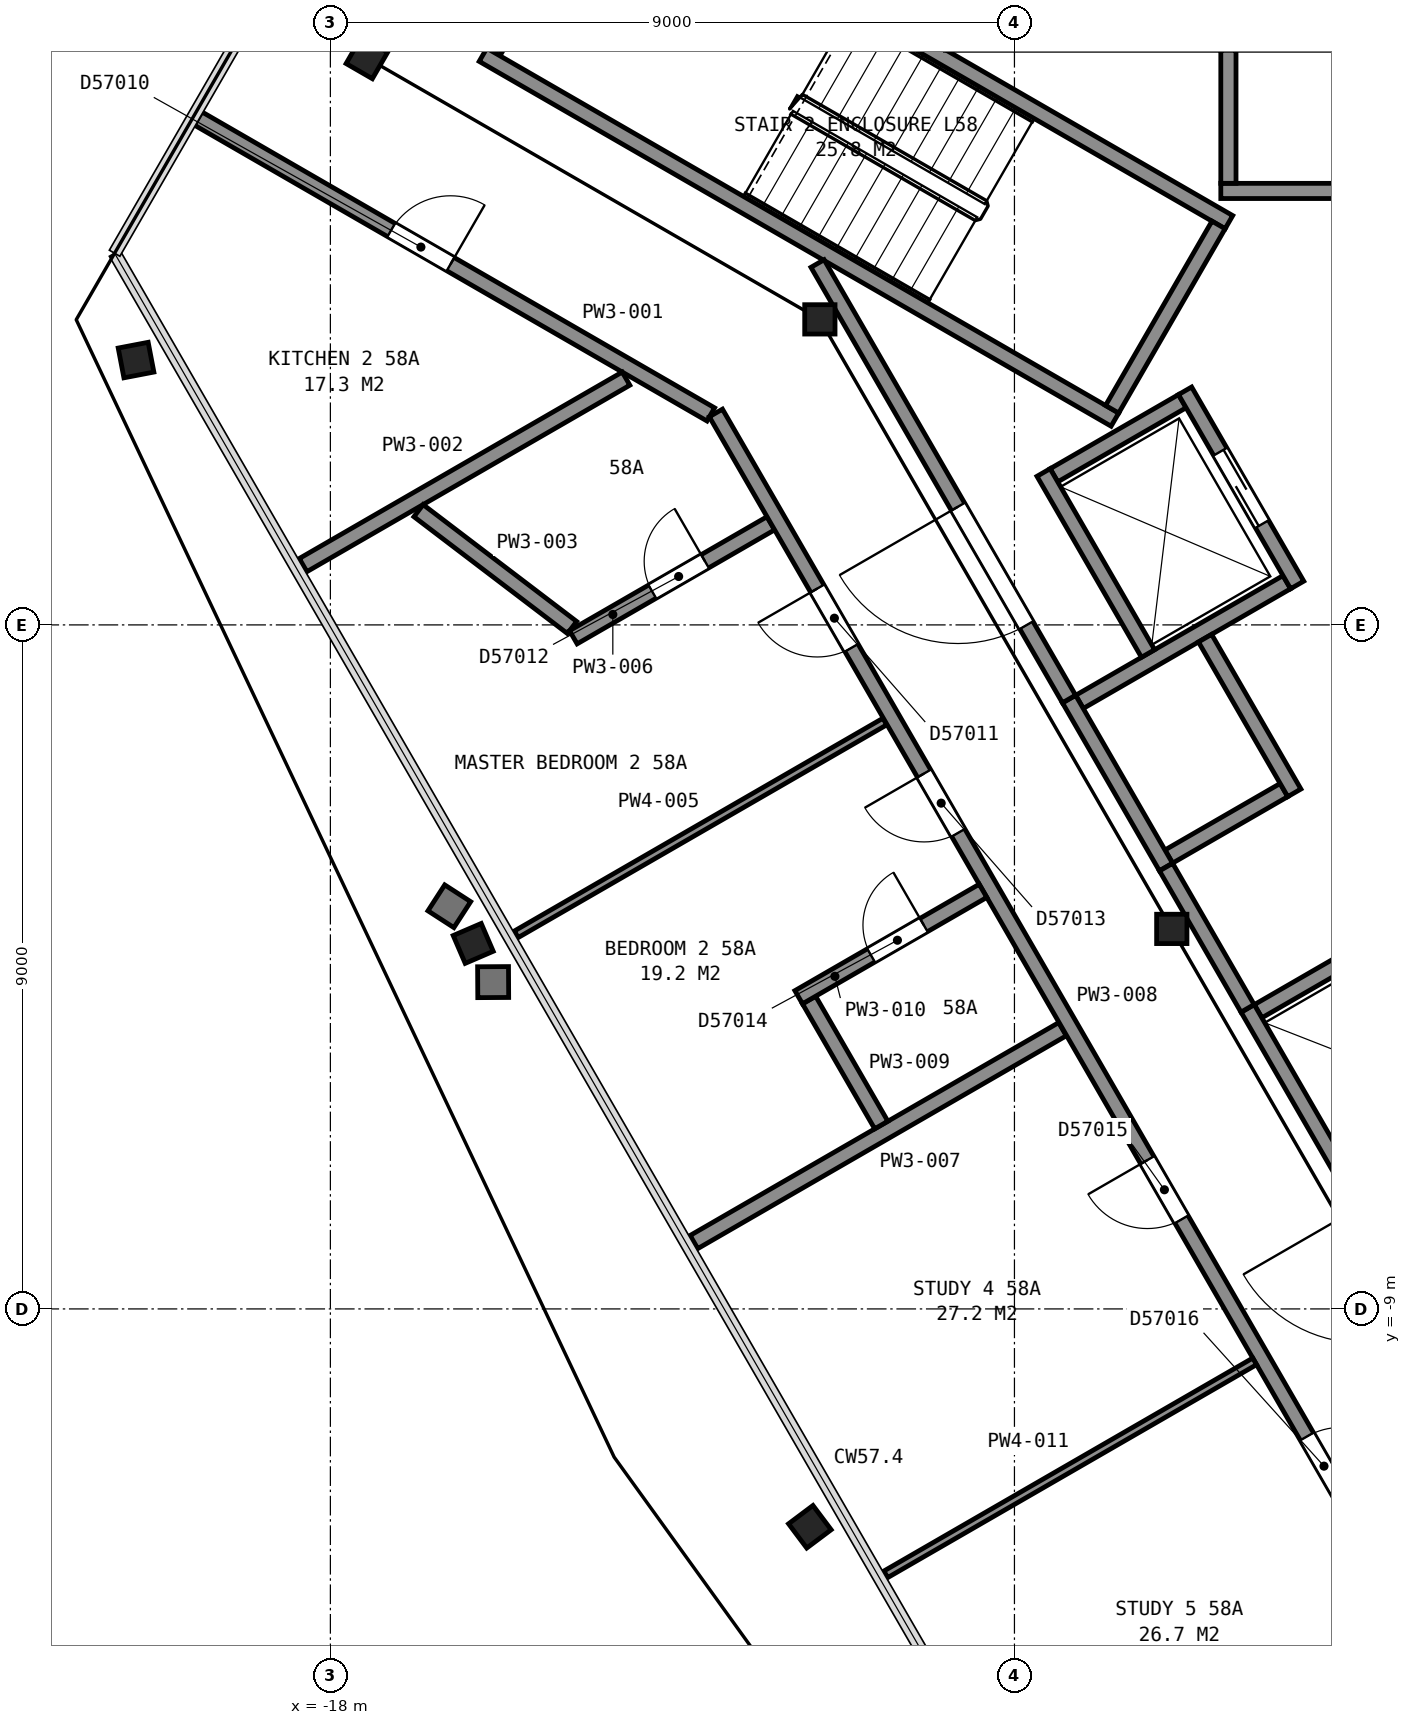
"""IFC4 building model, lengths in metres.
Left out: names, types, materials, properties, quantities, classifications, styles, units other than length and angle.
Written with IfcOpenShell. Run it as: python <this file> out.ifc"""

import sys

from ifc_helpers import new_model, si_unit, direction, frame, frame_2d, origin, origin_2d, place, context, subcontext, project, spatial, rectangle, i_section, extrude, element, fill, save


model = new_model("IFC4")
c1 = context("Model", 3, precision=1e-05, world=origin(), true_north=direction((0.0, 1.0)))
c2 = subcontext(c1, "Body", "Model", "MODEL_VIEW")
j1 = project(units=[si_unit("LENGTHUNIT", "METRE"), si_unit("PLANEANGLEUNIT", "RADIAN")], contexts=[c1])
p1 = place(None, origin())
s1 = spatial("IfcSite", under=j1, at=p1, CompositionType="ELEMENT")
p2 = place(p1, origin())
s2 = spatial("IfcBuilding", under=s1, at=p2, CompositionType="ELEMENT")
p3 = place(p2, frame((0.0, 0.0, 232.3)))
s3 = spatial("IfcBuildingStorey", under=s2, at=p3, CompositionType="ELEMENT", Elevation=232.3)
p4 = place(p3, frame((-20.328, 3.529, 0.04), z_axis=(-0.19341182923, -0.037095396991, 0.980416134015), x_axis=(-0.498932099925, 0.864144788984, -0.065730840066)))
e1 = element("IfcColumn", 1, at=p4, inside=s3, PredefinedType="COLUMN", context=c2, shape_type="SweptSolid", body=[
    extrude(i_section(OverallWidth=0.401, OverallDepth=0.399, WebThickness=0.025, FlangeThickness=0.04, FilletRadius=0.015, at=origin_2d()), origin(), (0.0, 0.0, 1.0), 3.692),
])
p5 = place(p3, frame((-15.916, -4.103, 0.035), z_axis=(-0.172603021318, -0.074378492921, 0.982179228462), x_axis=(-0.499986606679, 0.865745882945, -0.022303795753)))
e2 = element("IfcColumn", 2, at=p5, inside=s3, PredefinedType="COLUMN", context=c2, shape_type="SweptSolid", body=[
    extrude(i_section(OverallWidth=0.401, OverallDepth=0.399, WebThickness=0.025, FlangeThickness=0.04, FilletRadius=0.015, at=origin_2d()), origin(), (0.0, 0.0, 1.0), 3.696),
])
p6 = place(p3, frame((-11.515, -11.734, 0.035), z_axis=(-0.148684508118, -0.11154642209, 0.982573311649), x_axis=(-0.499994347872, 0.865733149293, 0.022622252559)))
e3 = element("IfcColumn", 3, at=p6, inside=s3, PredefinedType="COLUMN", context=c2, shape_type="SweptSolid", body=[
    extrude(i_section(OverallWidth=0.401, OverallDepth=0.399, WebThickness=0.025, FlangeThickness=0.04, FilletRadius=0.015, at=origin_2d()), origin(), (0.0, 0.0, 1.0), 3.695),
])
p7 = place(p3, frame((-17.52, 7.46, 0.0), z_axis=(0.0, 0.0, 1.0), x_axis=(0.5, 0.866025403784, 0.0)))
e4 = element("IfcColumn", 4, at=p7, inside=s3, PredefinedType="COLUMN", context=c2, shape_type="SweptSolid", body=[
    extrude(i_section(OverallWidth=0.401, OverallDepth=0.399, WebThickness=0.025, FlangeThickness=0.04, FilletRadius=0.015, at=origin_2d()), origin(), (0.0, 0.0, 1.0), 3.7),
])
for number, where, z_axis, x_axis in (
    (5, (-11.56, 4.02, 0.0), (0.0, 0.0, 1.0), (1.0, 0.0, 0.0)),
    (6, (-6.93, -4.0, 0.0), (0.0, 0.0, 1.0), (1.0, 0.0, 0.0)),
):
    element("IfcColumn", number, at=place(p3, frame(where, z_axis=z_axis, x_axis=x_axis)), inside=s3, PredefinedType="COLUMN", context=c2, shape_type="SweptSolid", body=[
        extrude(i_section(OverallWidth=0.399, OverallDepth=0.386, WebThickness=0.021, FlangeThickness=0.033, FilletRadius=0.015, at=origin_2d()), origin(), (0.0, 0.0, 1.0), 3.7),
    ])
p8 = place(p3, frame((-14.455, 9.962, 0.0), z_axis=(0.0, 0.0, 1.0), x_axis=(-0.500049511043, -0.865996816683, 0.0)))
e7 = element("IfcWall", 7, at=p8, inside=s3, PredefinedType="PARTITIONING", context=c2, shape_type="SweptSolid", body=[
    extrude(rectangle(XDim=2.8, YDim=0.2, at=frame_2d((1.4, 0.0))), origin(), (0.0, 0.0, 1.0), 3.45),
])
p9 = place(p8, frame((0.85, 0.0, 0.0)))
e8 = element("IfcOpeningElement", 8, at=p9, cuts=e7, PredefinedType="OPENING", context=c2, shape_type="SweptSolid", body=[
    extrude(rectangle(XDim=1.1, YDim=2.1, at=frame_2d((0.55, 1.05))), frame((0.0, 0.11, 0.0), z_axis=(0.0, -1.0, 0.0), x_axis=(1.0, 0.0, 0.0)), (0.0, 0.0, 1.0), 0.22),
])
for number, where, z_axis, x_axis in (
    (9, (-7.678, 2.701, 0.0), (0.0, 0.0, 1.0), (-0.866, 0.5, 0.0)),
    (10, (-6.178, 5.299, 0.0), (0.0, 0.0, 1.0), (-0.866, 0.5, 0.0)),
):
    element("IfcWall", number, at=place(p3, frame(where, z_axis=z_axis, x_axis=x_axis)), inside=s3, PredefinedType="PARTITIONING", context=c2, shape_type="SweptSolid", body=[
        extrude(rectangle(XDim=9.6, YDim=0.2, at=frame_2d((4.8, 0.0))), origin(), (0.0, 0.0, 1.0), 3.45),
    ])
p10 = place(p3, frame((-6.315, 5.262, 0.0), z_axis=(0.0, 0.0, 1.0), x_axis=(-0.500049511043, -0.865996816683, 0.0)))
e11 = element("IfcWall", 11, at=p10, inside=s3, PredefinedType="PARTITIONING", context=c2, shape_type="SweptSolid", body=[
    extrude(rectangle(XDim=2.8, YDim=0.2, at=frame_2d((1.4, 0.0))), origin(), (0.0, 0.0, 1.0), 3.45),
])
p11 = place(p3, frame((-6.285, 5.71, 0.0), z_axis=(0.0, 0.0, 1.0), x_axis=(1.0, 0.0, 0.0)))
e12 = element("IfcWall", 12, at=p11, inside=s3, PredefinedType="PARTITIONING", context=c2, shape_type="SweptSolid", body=[
    extrude(rectangle(XDim=2.35, YDim=0.2, at=frame_2d((1.175, 0.0))), origin(), (0.0, 0.0, 1.0), 3.7),
])
for number, where, z_axis, x_axis in (
    (13, (-5.795, -5.083, 0.0), (0.0, 0.0, 1.0), (0.866, 0.5, 0.0)),
    (14, (-6.97, -3.048, 0.0), (0.0, 0.0, 1.0), (0.866, 0.5, 0.0)),
):
    element("IfcWall", number, at=place(p3, frame(where, z_axis=z_axis, x_axis=x_axis)), inside=s3, PredefinedType="PARTITIONING", context=c2, shape_type="SweptSolid", body=[
        extrude(rectangle(XDim=1.75, YDim=0.2, at=frame_2d((0.875, 0.0))), origin(), (0.0, 0.0, 1.0), 3.7),
    ])
p12 = place(p3, frame((-8.145, -1.013, 0.0), z_axis=(0.0, 0.0, 1.0), x_axis=(0.866016494683, 0.500015430699, 0.0)))
e15 = element("IfcWall", 15, at=p12, inside=s3, PredefinedType="PARTITIONING", context=c2, shape_type="SweptSolid", body=[
    extrude(rectangle(XDim=3.15, YDim=0.2, at=frame_2d((1.575, 0.0))), origin(), (0.0, 0.0, 1.0), 3.7),
])
p13 = place(p3, frame((-8.48, 1.969, 0.0), z_axis=(0.0, 0.0, 1.0), x_axis=(0.866000020948, 0.500043961785, 0.0)))
e16 = element("IfcWall", 16, at=p13, inside=s3, PredefinedType="PARTITIONING", context=c2, shape_type="SweptSolid", body=[
    extrude(rectangle(XDim=1.95, YDim=0.2, at=frame_2d((0.975, 0.0))), origin(), (0.0, 0.0, 1.0), 3.7),
])
p14 = place(p3, frame((-6.185, 5.81, 0.0), z_axis=(0.0, 0.0, 1.0), x_axis=(0.0, 1.0, 0.0)))
e17 = element("IfcWall", 17, at=p14, inside=s3, PredefinedType="PARTITIONING", context=c2, shape_type="SweptSolid", body=[
    extrude(rectangle(XDim=1.75, YDim=0.2, at=frame_2d((0.875, 0.0))), origin(), (0.0, 0.0, 1.0), 3.7),
])
p15 = place(p3, frame((-5.28, 0.525, 0.0), z_axis=(0.0, 0.0, 1.0), x_axis=(-0.500037662692, 0.866003658127, 0.0)))
e18 = element("IfcWall", 18, at=p15, inside=s3, PredefinedType="PARTITIONING", context=c2, shape_type="SweptSolid", body=[
    extrude(rectangle(XDim=2.95, YDim=0.2, at=frame_2d((1.475, 0.0))), origin(), (0.0, 0.0, 1.0), 3.7),
])
p16 = place(p15, frame((0.925, 0.0, 0.0)))
e19 = element("IfcOpeningElement", 19, at=p16, cuts=e18, PredefinedType="OPENING", context=c2, shape_type="SweptSolid", body=[
    extrude(rectangle(XDim=1.1, YDim=2.1, at=frame_2d((0.55, 1.05))), frame((0.0, 0.11, 0.0), z_axis=(0.0, -1.0, 0.0), x_axis=(1.0, 0.0, 0.0)), (0.0, 0.0, 1.0), 0.22),
])
p17 = place(p3, frame((-5.318, -2.21, 0.0), z_axis=(0.0, 0.0, 1.0), x_axis=(-0.499938297808, 0.866061024631, 0.0)))
e20 = element("IfcWall", 20, at=p17, inside=s3, PredefinedType="PARTITIONING", context=c2, shape_type="SweptSolid", body=[
    extrude(rectangle(XDim=2.35, YDim=0.2, at=frame_2d((1.175, 0.0))), origin(), (0.0, 0.0, 1.0), 3.7),
])
p18 = place(p3, frame((-7.242, -0.376, 0.0), z_axis=(0.0, 0.0, 1.0), x_axis=(-0.499996545922, 0.866027397988, 0.0)))
e21 = element("IfcWall", 21, at=p18, inside=s3, PredefinedType="PARTITIONING", context=c2, shape_type="SweptSolid", body=[
    extrude(rectangle(XDim=2.75, YDim=0.2, at=frame_2d((1.375, 0.0))), origin(), (0.0, 0.0, 1.0), 3.7),
])
for number, where, z_axis, x_axis in (
    (22, (-4.656, -7.255, 0.0), (0.0, 0.0, 1.0), (-0.5, 0.866, 0.0)),
    (23, (-7.006, -3.185, 0.0), (0.0, 0.0, 1.0), (-0.5, 0.866, 0.0)),
):
    element("IfcWall", number, at=place(p3, frame(where, z_axis=z_axis, x_axis=x_axis)), inside=s3, PredefinedType="PARTITIONING", context=c2, shape_type="SweptSolid", body=[
        extrude(rectangle(XDim=2.55, YDim=0.2, at=frame_2d((1.275, 0.0))), origin(), (0.0, 0.0, 1.0), 3.7),
    ])
p19 = place(p3, frame((-11.591, 4.755, 0.0), z_axis=(0.0, 0.0, 1.0), x_axis=(0.500043977787, -0.866000011708, 0.0)))
e24 = element("IfcWall", 24, at=p19, inside=s3, PredefinedType="PARTITIONING", context=c2, shape_type="SweptSolid", body=[
    extrude(rectangle(XDim=6.617, YDim=0.2, at=frame_2d((3.308, 0.0))), origin(), (0.0, 0.0, 1.0), 3.45),
])
p20 = place(p19, frame((3.695, 0.0, 0.0)))
e25 = element("IfcOpeningElement", 25, at=p20, cuts=e24, PredefinedType="OPENING", context=c2, shape_type="SweptSolid", body=[
    extrude(rectangle(XDim=1.8, YDim=2.1, at=frame_2d((0.9, 1.05))), frame((0.0, 0.11, 0.0), z_axis=(0.0, -1.0, 0.0), x_axis=(1.0, 0.0, 0.0)), (0.0, 0.0, 1.0), 0.22),
])
p21 = place(p3, frame((-7.005, -3.187, 0.0), z_axis=(0.0, 0.0, 1.0), x_axis=(0.499689606989, -0.866204535123, 0.0)))
e26 = element("IfcWall", 26, at=p21, inside=s3, PredefinedType="PARTITIONING", context=c2, shape_type="SweptSolid", body=[
    extrude(rectangle(XDim=2.145, YDim=0.2, at=frame_2d((1.072, 0.0))), origin(), (0.0, 0.0, 1.0), 3.45),
])
p22 = place(p3, frame((-12.995, 2.77, 0.0), z_axis=(0.0, 0.0, 1.0), x_axis=(-0.866060835767, 0.499938624983, 0.0)))
e27 = element("IfcWall", 27, at=p22, inside=s3, PredefinedType="PARTITIONING", context=c2, shape_type="SweptSolid", body=[
    extrude(rectangle(XDim=7.789, YDim=0.2, at=frame_2d((3.894, 0.0))), origin(), (0.0, 0.0, 1.0), 2.713),
])
p23 = place(p22, frame((3.954, 0.0, 0.0)))
e28 = element("IfcOpeningElement", 28, at=p23, cuts=e27, PredefinedType="OPENING", context=c2, shape_type="SweptSolid", body=[
    extrude(rectangle(XDim=0.9, YDim=2.1, at=frame_2d((0.45, 1.05))), frame((0.0, 0.11, 0.0), z_axis=(0.0, -1.0, 0.0), x_axis=(1.0, 0.0, 0.0)), (0.0, 0.0, 1.0), 0.22),
])
p24 = place(p3, frame((-18.359, 0.787, 0.0), z_axis=(0.0, 0.0, 1.0), x_axis=(0.86596515875, 0.500104332946, 0.0)))
e29 = element("IfcWall", 29, at=p24, inside=s3, PredefinedType="PARTITIONING", context=c2, shape_type="SweptSolid", body=[
    extrude(rectangle(XDim=4.907, YDim=0.2, at=frame_2d((2.453, 0.0))), origin(), (0.0, 0.0, 1.0), 2.713),
])
p25 = place(p3, frame((-16.84, 1.503, 0.0), z_axis=(0.0, 0.0, 1.0), x_axis=(0.79576722268, -0.605602615012, 0.0)))
e30 = element("IfcWall", 30, at=p25, inside=s3, PredefinedType="PARTITIONING", context=c2, shape_type="SweptSolid", body=[
    extrude(rectangle(XDim=2.538, YDim=0.2, at=frame_2d((1.269, 0.0))), origin(), (0.0, 0.0, 1.0), 2.713),
])
p26 = place(p3, frame((-15.555, -4.071, 0.0), z_axis=(0.0, 0.0, 1.0), x_axis=(0.866083225238, 0.499899836928, 0.0)))
e31 = element("IfcWall", 31, at=p26, inside=s3, PredefinedType="PARTITIONING", context=c2, shape_type="SweptSolid", body=[
    extrude(rectangle(XDim=5.6, YDim=0.1, at=frame_2d((2.8, 0.0))), origin(), (0.0, 0.0, 1.0), 2.713),
])
p27 = place(p3, frame((-14.804, -0.163, 0.0), z_axis=(0.0, 0.0, 1.0), x_axis=(0.866031096941, 0.499990139034, 0.0)))
e32 = element("IfcWall", 32, at=p27, inside=s3, PredefinedType="PARTITIONING", context=c2, shape_type="SweptSolid", body=[
    extrude(rectangle(XDim=3.0, YDim=0.2, at=frame_2d((1.5, 0.0))), origin(), (0.0, 0.0, 1.0), 2.713),
])
p28 = place(p27, frame((1.2, 0.0, 0.0)))
e33 = element("IfcOpeningElement", 33, at=p28, cuts=e32, PredefinedType="OPENING", context=c2, shape_type="SweptSolid", body=[
    extrude(rectangle(XDim=0.8, YDim=2.1, at=frame_2d((0.4, 1.05))), frame((0.0, 0.11, 0.0), z_axis=(0.0, -1.0, 0.0), x_axis=(1.0, 0.0, 0.0)), (0.0, 0.0, 1.0), 0.22),
])
p29 = place(p3, frame((-13.217, -8.12, 0.0), z_axis=(0.0, 0.0, 1.0), x_axis=(0.865964107429, 0.500106153376, 0.0)))
e34 = element("IfcWall", 34, at=p29, inside=s3, PredefinedType="PARTITIONING", context=c2, shape_type="SweptSolid", body=[
    extrude(rectangle(XDim=5.599, YDim=0.2, at=frame_2d((2.8, 0.0))), origin(), (0.0, 0.0, 1.0), 2.713),
])
p30 = place(p3, frame((-4.075, -12.545, 0.0), z_axis=(0.0, 0.0, 1.0), x_axis=(-0.499997769292, 0.86602669168, 0.0)))
e35 = element("IfcWall", 35, at=p30, inside=s3, PredefinedType="PARTITIONING", context=c2, shape_type="SweptSolid", body=[
    extrude(rectangle(XDim=17.706, YDim=0.2, at=frame_2d((8.853, 0.0))), origin(), (0.0, 0.0, 1.0), 2.713),
])
p31 = place(p30, frame((14.138, 0.0, 0.0)))
e36 = element("IfcOpeningElement", 36, at=p31, cuts=e35, PredefinedType="OPENING", context=c2, shape_type="SweptSolid", body=[
    extrude(rectangle(XDim=0.9, YDim=2.1, at=frame_2d((0.45, 1.05))), frame((0.0, 0.11, 0.0), z_axis=(0.0, -1.0, 0.0), x_axis=(1.0, 0.0, 0.0)), (0.0, 0.0, 1.0), 0.22),
])
p32 = place(p30, frame((11.328, 0.0, 0.0)))
e37 = element("IfcOpeningElement", 37, at=p32, cuts=e35, PredefinedType="OPENING", context=c2, shape_type="SweptSolid", body=[
    extrude(rectangle(XDim=0.9, YDim=2.1, at=frame_2d((0.45, 1.05))), frame((0.0, 0.11, 0.0), z_axis=(0.0, -1.0, 0.0), x_axis=(1.0, 0.0, 0.0)), (0.0, 0.0, 1.0), 0.22),
])
p33 = place(p30, frame((5.454, 0.0, 0.0)))
e38 = element("IfcOpeningElement", 38, at=p33, cuts=e35, PredefinedType="OPENING", context=c2, shape_type="SweptSolid", body=[
    extrude(rectangle(XDim=0.9, YDim=2.1, at=frame_2d((0.45, 1.05))), frame((0.0, 0.11, 0.0), z_axis=(0.0, -1.0, 0.0), x_axis=(1.0, 0.0, 0.0)), (0.0, 0.0, 1.0), 0.22),
])
p34 = place(p30, frame((1.255, 0.0, 0.0)))
e39 = element("IfcOpeningElement", 39, at=p34, cuts=e35, PredefinedType="OPENING", context=c2, shape_type="SweptSolid", body=[
    extrude(rectangle(XDim=0.9, YDim=2.1, at=frame_2d((0.45, 1.05))), frame((0.0, 0.11, 0.0), z_axis=(0.0, -1.0, 0.0), x_axis=(1.0, 0.0, 0.0)), (0.0, 0.0, 1.0), 0.22),
])
p35 = place(p3, frame((-11.702, -4.936, 0.0), z_axis=(0.0, 0.0, 1.0), x_axis=(0.500134112126, -0.865947960265, 0.0)))
e40 = element("IfcWall", 40, at=p35, inside=s3, PredefinedType="PARTITIONING", context=c2, shape_type="SweptSolid", body=[
    extrude(rectangle(XDim=1.899, YDim=0.2, at=frame_2d((0.95, 0.0))), origin(), (0.0, 0.0, 1.0), 2.713),
])
p36 = place(p3, frame((-9.414, -3.499, 0.0), z_axis=(0.0, 0.0, 1.0), x_axis=(-0.866056369097, -0.49994636267, 0.0)))
e41 = element("IfcWall", 41, at=p36, inside=s3, PredefinedType="PARTITIONING", context=c2, shape_type="SweptSolid", body=[
    extrude(rectangle(XDim=2.8, YDim=0.2, at=frame_2d((1.4, 0.0))), origin(), (0.0, 0.0, 1.0), 2.713),
])
p37 = place(p36, frame((0.9, 0.0, 0.0)))
e42 = element("IfcOpeningElement", 42, at=p37, cuts=e41, PredefinedType="OPENING", context=c2, shape_type="SweptSolid", body=[
    extrude(rectangle(XDim=0.8, YDim=2.1, at=frame_2d((0.4, 1.05))), frame((0.0, 0.11, 0.0), z_axis=(0.0, -1.0, 0.0), x_axis=(1.0, 0.0, 0.0)), (0.0, 0.0, 1.0), 0.22),
])
p38 = place(p3, frame((-10.693, -12.492, 0.0), z_axis=(0.0, 0.0, 1.0), x_axis=(0.866017266313, 0.500014094249, 0.0)))
e43 = element("IfcWall", 43, at=p38, inside=s3, PredefinedType="PARTITIONING", context=c2, shape_type="SweptSolid", body=[
    extrude(rectangle(XDim=5.604, YDim=0.1, at=frame_2d((2.802, 0.0))), origin(), (0.0, 0.0, 1.0), 2.713),
])
p39 = place(p16, origin())
e44 = element("IfcDoor", 44, at=p39, inside=s3, OperationType="SLIDING_TO_LEFT", PredefinedType="DOOR", context=c2, shape_type="SweptSolid", body=[
    extrude(rectangle(XDim=1.1, YDim=2.1, at=frame_2d((0.55, 1.05))), frame((0.0, 0.025, 0.0), z_axis=(0.0, -1.0, 0.0), x_axis=(1.0, 0.0, 0.0)), (0.0, 0.0, 1.0), 0.05),
])
fill(e19, e44)
p40 = place(p20, origin())
e45 = element("IfcDoor", 45, at=p40, inside=s3, OperationType="DOUBLE_DOOR_SINGLE_SWING", PredefinedType="DOOR", context=c2, shape_type="SweptSolid", body=[
    extrude(rectangle(XDim=1.8, YDim=2.1, at=frame_2d((0.9, 1.05))), frame((0.0, 0.025, 0.0), z_axis=(0.0, -1.0, 0.0), x_axis=(1.0, 0.0, 0.0)), (0.0, 0.0, 1.0), 0.05),
])
fill(e25, e45)
p41 = place(p23, origin())
e46 = element("IfcDoor", 46, at=p41, inside=s3, OperationType="SINGLE_SWING_LEFT", PredefinedType="DOOR", context=c2, shape_type="SweptSolid", body=[
    extrude(rectangle(XDim=0.9, YDim=2.1, at=frame_2d((0.45, 1.05))), frame((0.0, 0.025, 0.0), z_axis=(0.0, -1.0, 0.0), x_axis=(1.0, 0.0, 0.0)), (0.0, 0.0, 1.0), 0.05),
])
fill(e28, e46)
p42 = place(p28, origin())
e47 = element("IfcDoor", 47, at=p42, inside=s3, OperationType="SINGLE_SWING_RIGHT", PredefinedType="DOOR", context=c2, shape_type="SweptSolid", body=[
    extrude(rectangle(XDim=0.8, YDim=2.1, at=frame_2d((0.4, 1.05))), frame((0.0, 0.025, 0.0), z_axis=(0.0, -1.0, 0.0), x_axis=(1.0, 0.0, 0.0)), (0.0, 0.0, 1.0), 0.05),
])
fill(e33, e47)
p43 = place(p31, origin())
e48 = element("IfcDoor", 48, at=p43, inside=s3, OperationType="SINGLE_SWING_RIGHT", PredefinedType="DOOR", context=c2, shape_type="SweptSolid", body=[
    extrude(rectangle(XDim=0.9, YDim=2.1, at=frame_2d((0.45, 1.05))), frame((0.0, 0.025, 0.0), z_axis=(0.0, -1.0, 0.0), x_axis=(1.0, 0.0, 0.0)), (0.0, 0.0, 1.0), 0.05),
])
fill(e36, e48)
p44 = place(p32, origin())
e49 = element("IfcDoor", 49, at=p44, inside=s3, OperationType="SINGLE_SWING_RIGHT", PredefinedType="DOOR", context=c2, shape_type="SweptSolid", body=[
    extrude(rectangle(XDim=0.9, YDim=2.1, at=frame_2d((0.45, 1.05))), frame((0.0, 0.025, 0.0), z_axis=(0.0, -1.0, 0.0), x_axis=(1.0, 0.0, 0.0)), (0.0, 0.0, 1.0), 0.05),
])
fill(e37, e49)
p45 = place(p33, origin())
e50 = element("IfcDoor", 50, at=p45, inside=s3, OperationType="SINGLE_SWING_RIGHT", PredefinedType="DOOR", context=c2, shape_type="SweptSolid", body=[
    extrude(rectangle(XDim=0.9, YDim=2.1, at=frame_2d((0.45, 1.05))), frame((0.0, 0.025, 0.0), z_axis=(0.0, -1.0, 0.0), x_axis=(1.0, 0.0, 0.0)), (0.0, 0.0, 1.0), 0.05),
])
fill(e38, e50)
p46 = place(p34, origin())
e51 = element("IfcDoor", 51, at=p46, inside=s3, OperationType="SINGLE_SWING_LEFT", PredefinedType="DOOR", context=c2, shape_type="SweptSolid", body=[
    extrude(rectangle(XDim=0.9, YDim=2.1, at=frame_2d((0.45, 1.05))), frame((0.0, 0.025, 0.0), z_axis=(0.0, -1.0, 0.0), x_axis=(1.0, 0.0, 0.0)), (0.0, 0.0, 1.0), 0.05),
])
fill(e39, e51)
p47 = place(p37, origin())
e52 = element("IfcDoor", 52, at=p47, inside=s3, OperationType="SINGLE_SWING_LEFT", PredefinedType="DOOR", context=c2, shape_type="SweptSolid", body=[
    extrude(rectangle(XDim=0.8, YDim=2.1, at=frame_2d((0.4, 1.05))), frame((0.0, 0.025, 0.0), z_axis=(0.0, -1.0, 0.0), x_axis=(1.0, 0.0, 0.0)), (0.0, 0.0, 1.0), 0.05),
])
fill(e42, e52)
save(model, sys.argv[1])
